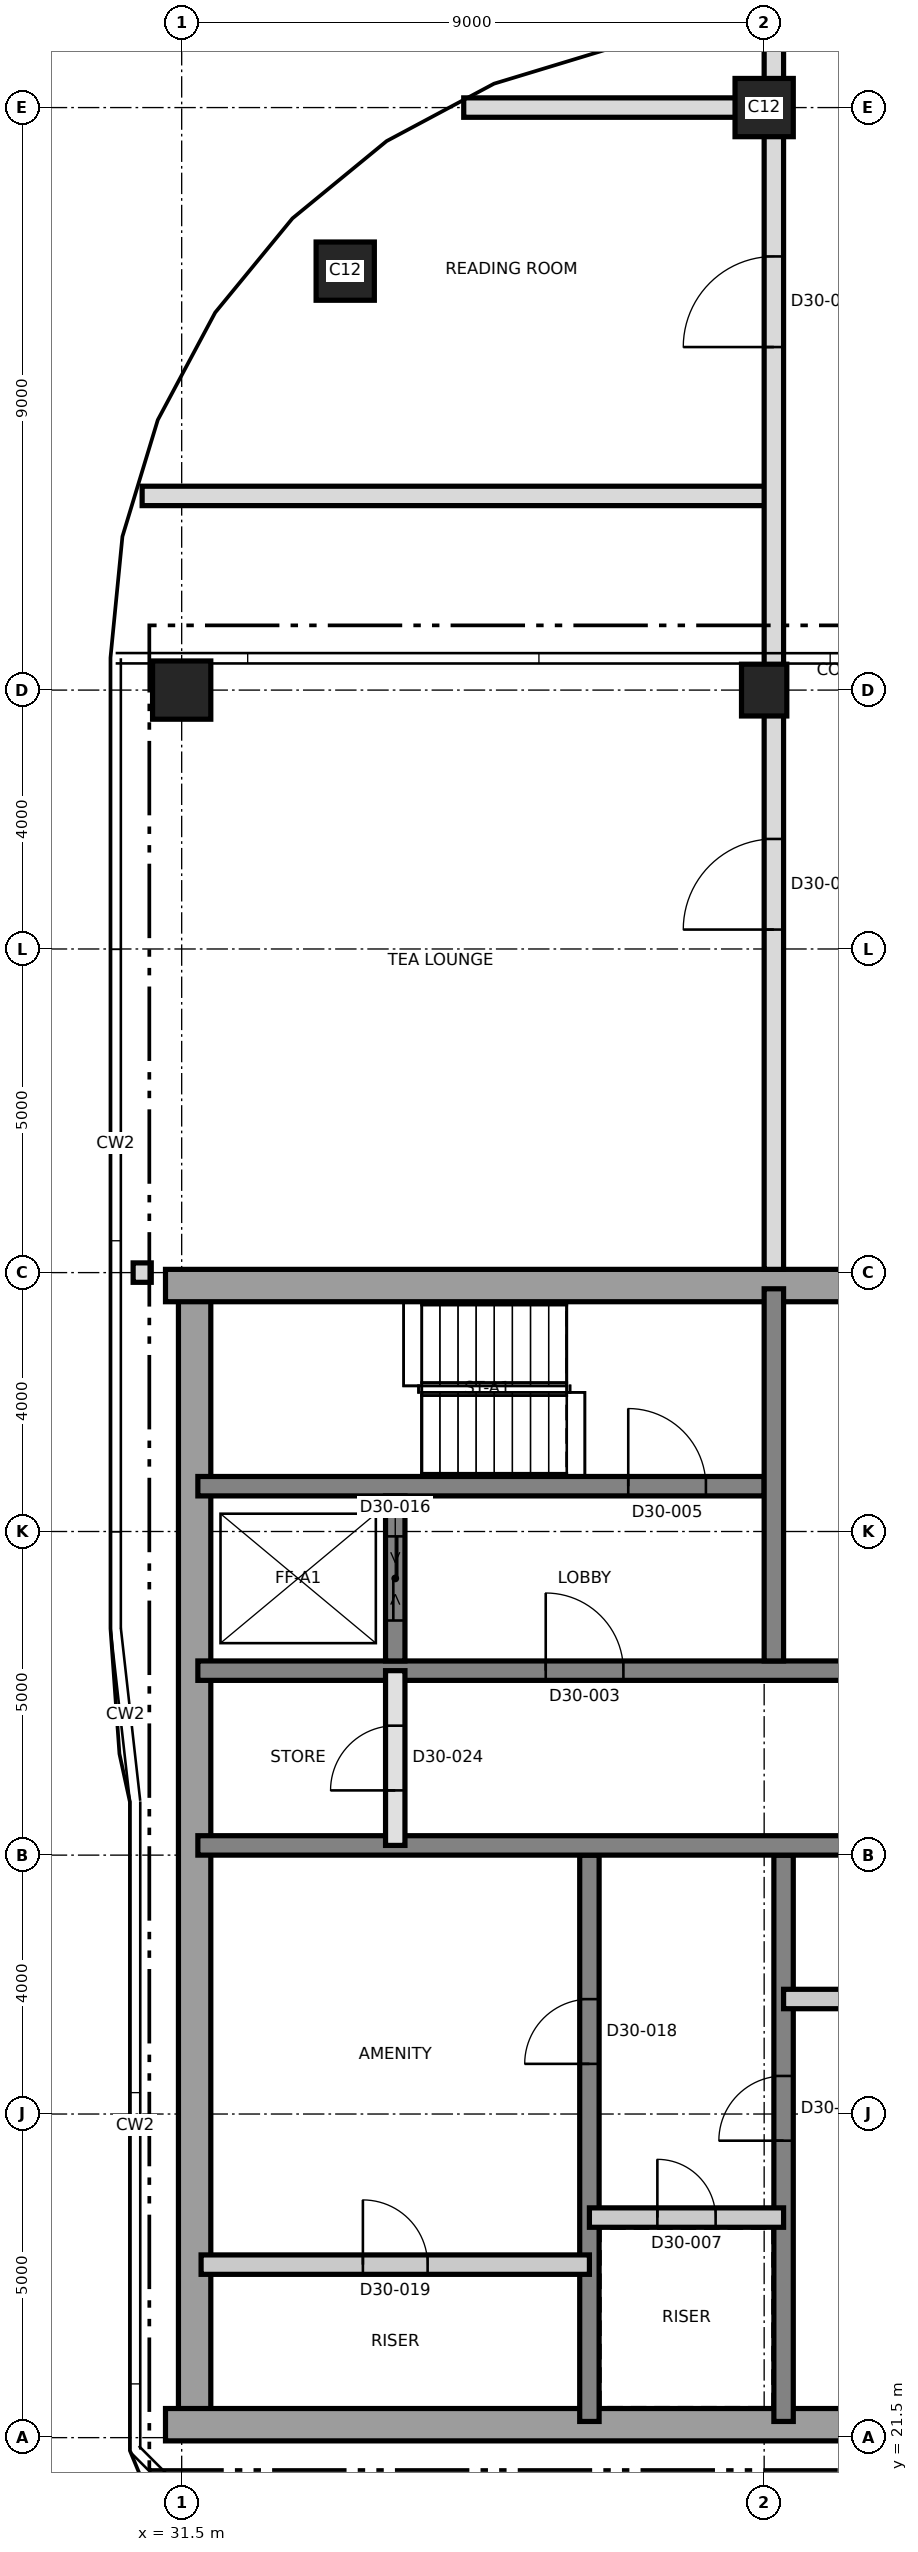
"""IFC4 building model, lengths in metres.
Left out: names, types, materials, properties, quantities, classifications, styles, units other than length and angle.
Written with IfcOpenShell. Run it as: python <this file> out.ifc"""

import sys

from ifc_helpers import new_model, si_unit, direction, frame, frame_2d, origin, origin_2d, place, context, subcontext, project, spatial, rectangle, extrude, element, fill, save


model = new_model("IFC4")
c1 = context("Model", 3, precision=1e-05, world=origin(), true_north=direction((0.0, 1.0)))
c2 = subcontext(c1, "Body", "Model", "MODEL_VIEW")
j1 = project(units=[si_unit("LENGTHUNIT", "METRE"), si_unit("PLANEANGLEUNIT", "RADIAN")], contexts=[c1])
p1 = place(None, origin())
s1 = spatial("IfcSite", under=j1, at=p1, CompositionType="ELEMENT")
p2 = place(p1, origin())
s2 = spatial("IfcBuilding", under=s1, at=p2, CompositionType="ELEMENT")
p3 = place(p2, frame((0.0, 0.0, 260.9)))
s3 = spatial("IfcBuildingStorey", under=s2, at=p3, CompositionType="ELEMENT", Elevation=260.9)
p4 = place(p3, frame((31.7, 21.75, 0.0), z_axis=(0.0, 0.0, 1.0), x_axis=(0.0, 1.0, 0.0)))
e1 = element("IfcWall", 1, at=p4, inside=s3, PredefinedType="SHEAR", context=c2, shape_type="SweptSolid", body=[
    extrude(rectangle(XDim=17.5, YDim=0.5, at=frame_2d((8.75, 0.0))), origin(), (0.0, 0.0, 1.0), 6.0),
])
p5 = place(p3, frame((31.25, 21.7, 0.0), z_axis=(0.0, 0.0, 1.0), x_axis=(1.0, 0.0, 0.0)))
e2 = element("IfcWall", 2, at=p5, inside=s3, PredefinedType="SHEAR", context=c2, shape_type="SweptSolid", body=[
    extrude(rectangle(XDim=27.0, YDim=0.5, at=frame_2d((13.5, 0.0))), origin(), (0.0, 0.0, 1.0), 6.0),
])
p6 = place(p3, frame((31.25, 39.3, 0.0), z_axis=(0.0, 0.0, 1.0), x_axis=(1.0, 0.0, 0.0)))
e3 = element("IfcWall", 3, at=p6, inside=s3, PredefinedType="SHEAR", context=c2, shape_type="SweptSolid", body=[
    extrude(rectangle(XDim=27.0, YDim=0.5, at=frame_2d((13.5, 0.0))), origin(), (0.0, 0.0, 1.0), 6.0),
])
p7 = place(p6, frame((10.45, 0.0, 0.0)))
e4 = element("IfcOpeningElement", 4, at=p7, cuts=e3, PredefinedType="OPENING", context=c2, shape_type="SweptSolid", body=[
    extrude(rectangle(XDim=1.2, YDim=2.1, at=frame_2d((0.6, 1.05))), frame((0.0, 0.26, 0.0), z_axis=(0.0, -1.0, 0.0), x_axis=(1.0, 0.0, 0.0)), (0.0, 0.0, 1.0), 0.52),
])
p8 = place(p3, frame((37.8, 21.75, 0.0), z_axis=(0.0, 0.0, 1.0), x_axis=(0.0, 1.0, 0.0)))
e5 = element("IfcWall", 5, at=p8, inside=s3, PredefinedType="SHEAR", context=c2, shape_type="SweptSolid", body=[
    extrude(rectangle(XDim=8.75, YDim=0.3, at=frame_2d((4.375, 0.0))), origin(), (0.0, 0.0, 1.0), 6.0),
])
p9 = place(p8, frame((5.525, 0.0, 0.0)))
e6 = element("IfcOpeningElement", 6, at=p9, cuts=e5, PredefinedType="OPENING", context=c2, shape_type="SweptSolid", body=[
    extrude(rectangle(XDim=1.0, YDim=2.1, at=frame_2d((0.5, 1.05))), frame((0.0, 0.16, 0.0), z_axis=(0.0, -1.0, 0.0), x_axis=(1.0, 0.0, 0.0)), (0.0, 0.0, 1.0), 0.32),
])
p10 = place(p3, frame((40.8, 21.75, 0.0), z_axis=(0.0, 0.0, 1.0), x_axis=(0.0, 1.0, 0.0)))
e7 = element("IfcWall", 7, at=p10, inside=s3, PredefinedType="SHEAR", context=c2, shape_type="SweptSolid", body=[
    extrude(rectangle(XDim=8.75, YDim=0.3, at=frame_2d((4.375, 0.0))), origin(), (0.0, 0.0, 1.0), 6.0),
])
p11 = place(p10, frame((4.338, 0.0, 0.0)))
e8 = element("IfcOpeningElement", 8, at=p11, cuts=e7, PredefinedType="OPENING", context=c2, shape_type="SweptSolid", body=[
    extrude(rectangle(XDim=1.0, YDim=2.1, at=frame_2d((0.5, 1.05))), frame((0.0, 0.16, 0.0), z_axis=(0.0, -1.0, 0.0), x_axis=(1.0, 0.0, 0.0)), (0.0, 0.0, 1.0), 0.32),
])
p12 = place(p3, frame((31.75, 30.65, 0.0), z_axis=(0.0, 0.0, 1.0), x_axis=(1.0, 0.0, 0.0)))
e9 = element("IfcWall", 9, at=p12, inside=s3, PredefinedType="SHEAR", context=c2, shape_type="SweptSolid", body=[
    extrude(rectangle(XDim=26.5, YDim=0.3, at=frame_2d((13.25, 0.0))), origin(), (0.0, 0.0, 1.0), 6.0),
])
p13 = place(p12, frame((24.75, 0.0, 0.0)))
e10 = element("IfcOpeningElement", 10, at=p13, cuts=e9, PredefinedType="OPENING", context=c2, shape_type="SweptSolid", body=[
    extrude(rectangle(XDim=1.0, YDim=2.1, at=frame_2d((0.5, 1.05))), frame((0.0, 0.16, 0.0), z_axis=(0.0, -1.0, 0.0), x_axis=(1.0, 0.0, 0.0)), (0.0, 0.0, 1.0), 0.32),
])
p14 = place(p12, frame((11.55, 0.0, 0.0)))
e11 = element("IfcOpeningElement", 11, at=p14, cuts=e9, PredefinedType="OPENING", context=c2, shape_type="SweptSolid", body=[
    extrude(rectangle(XDim=1.0, YDim=2.1, at=frame_2d((0.5, 1.05))), frame((0.0, 0.16, 0.0), z_axis=(0.0, -1.0, 0.0), x_axis=(1.0, 0.0, 0.0)), (0.0, 0.0, 1.0), 0.32),
])
p15 = place(p3, frame((31.75, 33.35, 0.0), z_axis=(0.0, 0.0, 1.0), x_axis=(1.0, 0.0, 0.0)))
e12 = element("IfcWall", 12, at=p15, inside=s3, PredefinedType="SHEAR", context=c2, shape_type="SweptSolid", body=[
    extrude(rectangle(XDim=26.5, YDim=0.3, at=frame_2d((13.25, 0.0))), origin(), (0.0, 0.0, 1.0), 6.0),
])
p16 = place(p15, frame((13.9, 0.0, 0.0)))
e13 = element("IfcOpeningElement", 13, at=p16, cuts=e12, PredefinedType="OPENING", context=c2, shape_type="SweptSolid", body=[
    extrude(rectangle(XDim=1.4, YDim=2.1, at=frame_2d((0.7, 1.05))), frame((0.0, 0.16, 0.0), z_axis=(0.0, -1.0, 0.0), x_axis=(1.0, 0.0, 0.0)), (0.0, 0.0, 1.0), 0.32),
])
p17 = place(p15, frame((5.375, 0.0, 0.0)))
e14 = element("IfcOpeningElement", 14, at=p17, cuts=e12, PredefinedType="OPENING", context=c2, shape_type="SweptSolid", body=[
    extrude(rectangle(XDim=1.2, YDim=2.1, at=frame_2d((0.6, 1.05))), frame((0.0, 0.16, 0.0), z_axis=(0.0, -1.0, 0.0), x_axis=(1.0, 0.0, 0.0)), (0.0, 0.0, 1.0), 0.32),
])
p18 = place(p15, frame((19.925, 0.0, 0.0)))
e15 = element("IfcOpeningElement", 15, at=p18, cuts=e12, PredefinedType="OPENING", context=c2, shape_type="SweptSolid", body=[
    extrude(rectangle(XDim=1.2, YDim=2.1, at=frame_2d((0.6, 1.05))), frame((0.0, 0.16, 0.0), z_axis=(0.0, -1.0, 0.0), x_axis=(1.0, 0.0, 0.0)), (0.0, 0.0, 1.0), 0.32),
])
p19 = place(p3, frame((31.75, 36.2, 0.0), z_axis=(0.0, 0.0, 1.0), x_axis=(1.0, 0.0, 0.0)))
e16 = element("IfcWall", 16, at=p19, inside=s3, PredefinedType="SHEAR", context=c2, shape_type="SweptSolid", body=[
    extrude(rectangle(XDim=8.75, YDim=0.3, at=frame_2d((4.375, 0.0))), origin(), (0.0, 0.0, 1.0), 6.0),
])
p20 = place(p19, frame((6.65, 0.0, 0.0)))
e17 = element("IfcOpeningElement", 17, at=p20, cuts=e16, PredefinedType="OPENING", context=c2, shape_type="SweptSolid", body=[
    extrude(rectangle(XDim=1.2, YDim=2.1, at=frame_2d((0.6, 1.05))), frame((0.0, 0.16, 0.0), z_axis=(0.0, -1.0, 0.0), x_axis=(1.0, 0.0, 0.0)), (0.0, 0.0, 1.0), 0.32),
])
p21 = place(p3, frame((40.65, 33.5, 0.0), z_axis=(0.0, 0.0, 1.0), x_axis=(0.0, 1.0, 0.0)))
e18 = element("IfcWall", 18, at=p21, inside=s3, PredefinedType="SHEAR", context=c2, shape_type="SweptSolid", body=[
    extrude(rectangle(XDim=5.75, YDim=0.3, at=frame_2d((2.875, 0.0))), origin(), (0.0, 0.0, 1.0), 6.0),
])
p22 = place(p3, frame((34.8, 33.5, 0.0), z_axis=(0.0, 0.0, 1.0), x_axis=(0.0, 1.0, 0.0)))
e19 = element("IfcWall", 19, at=p22, inside=s3, PredefinedType="SHEAR", context=c2, shape_type="SweptSolid", body=[
    extrude(rectangle(XDim=2.55, YDim=0.3, at=frame_2d((1.275, 0.0))), origin(), (0.0, 0.0, 1.0), 6.0),
])
p23 = place(p22, frame((0.625, 0.0, 0.0)))
e20 = element("IfcOpeningElement", 20, at=p23, cuts=e19, PredefinedType="OPENING", context=c2, shape_type="SweptSolid", body=[
    extrude(rectangle(XDim=1.3, YDim=2.4, at=frame_2d((0.65, 1.2))), frame((0.0, 0.16, 0.0), z_axis=(0.0, -1.0, 0.0), x_axis=(1.0, 0.0, 0.0)), (0.0, 0.0, 1.0), 0.32),
])
p24 = place(p3, frame((31.5, 48.5, 0.0), z_axis=(0.0, 0.0, 1.0), x_axis=(1.0, 0.0, 0.0)))
e21 = element("IfcColumn", 21, at=p24, inside=s3, PredefinedType="COLUMN", context=c2, shape_type="SweptSolid", body=[
    extrude(rectangle(XDim=0.9, YDim=0.9, at=origin_2d()), origin(), (0.0, 0.0, 1.0), 6.0),
])
p25 = place(p3, frame((40.5, 48.5, 0.0), z_axis=(0.0, 0.0, 1.0), x_axis=(0.0, 1.0, 0.0)))
e22 = element("IfcColumn", 22, at=p25, inside=s3, PredefinedType="COLUMN", context=c2, shape_type="SweptSolid", body=[
    extrude(rectangle(XDim=0.8, YDim=0.7, at=origin_2d()), origin(), (0.0, 0.0, 1.0), 6.0),
])
for number, where, z_axis, x_axis in (
    (23, (34.027, 54.973, 0.0), (0.0, 0.0, 1.0), (1.0, 0.0, 0.0)),
    (24, (40.5, 57.5, 0.0), (0.0, 0.0, 1.0), (1.0, 0.0, 0.0)),
):
    element("IfcColumn", number, at=place(p3, frame(where, z_axis=z_axis, x_axis=x_axis)), inside=s3, PredefinedType="COLUMN", context=c2, shape_type="SweptSolid", body=[
        extrude(rectangle(XDim=0.9, YDim=0.9, at=origin_2d()), origin(), (0.0, 0.0, 1.0), 6.0),
    ])
p26 = place(p3, frame((31.8, 24.173, 0.0), z_axis=(0.0, 0.0, 1.0), x_axis=(1.0, 0.0, 0.0)))
e25 = element("IfcWall", 25, at=p26, inside=s3, PredefinedType="PARTITIONING", context=c2, shape_type="SweptSolid", body=[
    extrude(rectangle(XDim=6.0, YDim=0.3, at=frame_2d((3.0, 0.0))), origin(), (0.0, 0.0, 1.0), 5.7),
])
p27 = place(p26, frame((2.5, 0.0, 0.0)))
e26 = element("IfcOpeningElement", 26, at=p27, cuts=e25, PredefinedType="OPENING", context=c2, shape_type="SweptSolid", body=[
    extrude(rectangle(XDim=1.0, YDim=2.1, at=frame_2d((0.5, 1.05))), frame((0.0, 0.16, 0.0), z_axis=(0.0, -1.0, 0.0), x_axis=(1.0, 0.0, 0.0)), (0.0, 0.0, 1.0), 0.32),
])
p28 = place(p3, frame((37.8, 24.9, 0.0), z_axis=(0.0, 0.0, 1.0), x_axis=(1.0, 0.0, 0.0)))
e27 = element("IfcWall", 27, at=p28, inside=s3, PredefinedType="PARTITIONING", context=c2, shape_type="SweptSolid", body=[
    extrude(rectangle(XDim=3.0, YDim=0.3, at=frame_2d((1.5, 0.0))), origin(), (0.0, 0.0, 1.0), 5.7),
])
p29 = place(p28, frame((1.05, 0.0, 0.0)))
e28 = element("IfcOpeningElement", 28, at=p29, cuts=e27, PredefinedType="OPENING", context=c2, shape_type="SweptSolid", body=[
    extrude(rectangle(XDim=0.9, YDim=2.1, at=frame_2d((0.45, 1.05))), frame((0.0, 0.16, 0.0), z_axis=(0.0, -1.0, 0.0), x_axis=(1.0, 0.0, 0.0)), (0.0, 0.0, 1.0), 0.32),
])
p30 = place(p3, frame((40.8, 28.277, 0.0), z_axis=(0.0, 0.0, 1.0), x_axis=(1.0, 0.0, 0.0)))
e29 = element("IfcWall", 29, at=p30, inside=s3, PredefinedType="PARTITIONING", context=c2, shape_type="SweptSolid", body=[
    extrude(rectangle(XDim=6.0, YDim=0.3, at=frame_2d((3.0, 0.0))), origin(), (0.0, 0.0, 1.0), 5.7),
])
p31 = place(p3, frame((34.8, 30.65, 0.0), z_axis=(0.0, 0.0, 1.0), x_axis=(0.0, 1.0, 0.0)))
e30 = element("IfcWall", 30, at=p31, inside=s3, PredefinedType="SOLIDWALL", context=c2, shape_type="SweptSolid", body=[
    extrude(rectangle(XDim=2.7, YDim=0.3, at=frame_2d((1.35, 0.0))), origin(), (0.0, 0.0, 1.0), 5.7),
])
p32 = place(p31, frame((0.85, 0.0, 0.0)))
e31 = element("IfcOpeningElement", 31, at=p32, cuts=e30, PredefinedType="OPENING", context=c2, shape_type="SweptSolid", body=[
    extrude(rectangle(XDim=1.0, YDim=2.1, at=frame_2d((0.5, 1.05))), frame((0.0, 0.16, 0.0), z_axis=(0.0, -1.0, 0.0), x_axis=(1.0, 0.0, 0.0)), (0.0, 0.0, 1.0), 0.32),
])
p33 = place(p3, frame((30.75, 39.5, 0.0), z_axis=(0.0, 0.0, 1.0), x_axis=(1.0, 0.0, 0.0)))
e32 = element("IfcWall", 32, at=p33, inside=s3, PredefinedType="PARTITIONING", context=c2, shape_type="SweptSolid", body=[
    extrude(rectangle(XDim=0.28, YDim=0.3, at=frame_2d((0.14, 0.0))), origin(), (0.0, 0.0, 1.0), 5.7),
])
p34 = place(p3, frame((30.889, 51.5, 0.0), z_axis=(0.0, 0.0, 1.0), x_axis=(1.0, 0.0, 0.0)))
e33 = element("IfcWall", 33, at=p34, inside=s3, PredefinedType="PARTITIONING", context=c2, shape_type="SweptSolid", body=[
    extrude(rectangle(XDim=9.761, YDim=0.3, at=frame_2d((4.88, 0.0))), origin(), (0.0, 0.0, 1.0), 5.65),
])
p35 = place(p3, frame((35.858, 57.5, 0.0), z_axis=(0.0, 0.0, 1.0), x_axis=(1.0, 0.0, 0.0)))
e34 = element("IfcWall", 34, at=p35, inside=s3, PredefinedType="PARTITIONING", context=c2, shape_type="SweptSolid", body=[
    extrude(rectangle(XDim=4.792, YDim=0.3, at=frame_2d((2.396, 0.0))), origin(), (0.0, 0.0, 1.0), 5.65),
])
p36 = place(p3, frame((40.65, 39.55, 0.0), z_axis=(0.0, 0.0, 1.0), x_axis=(0.0, 1.0, 0.0)))
e35 = element("IfcWall", 35, at=p36, inside=s3, PredefinedType="PARTITIONING", context=c2, shape_type="SweptSolid", body=[
    extrude(rectangle(XDim=18.94, YDim=0.3, at=frame_2d((9.47, 0.0))), origin(), (0.0, 0.0, 1.0), 5.65),
])
p37 = place(p36, frame((5.25, 0.0, 0.0)))
e36 = element("IfcOpeningElement", 36, at=p37, cuts=e35, PredefinedType="OPENING", context=c2, shape_type="SweptSolid", body=[
    extrude(rectangle(XDim=1.4, YDim=2.1, at=frame_2d((0.7, 1.05))), frame((0.0, 0.16, 0.0), z_axis=(0.0, -1.0, 0.0), x_axis=(1.0, 0.0, 0.0)), (0.0, 0.0, 1.0), 0.32),
])
p38 = place(p36, frame((14.25, 0.0, 0.0)))
e37 = element("IfcOpeningElement", 37, at=p38, cuts=e35, PredefinedType="OPENING", context=c2, shape_type="SweptSolid", body=[
    extrude(rectangle(XDim=1.4, YDim=2.1, at=frame_2d((0.7, 1.05))), frame((0.0, 0.16, 0.0), z_axis=(0.0, -1.0, 0.0), x_axis=(1.0, 0.0, 0.0)), (0.0, 0.0, 1.0), 0.32),
])
p39 = place(p17, origin())
e38 = element("IfcDoor", 38, at=p39, inside=s3, OperationType="SINGLE_SWING_LEFT", PredefinedType="DOOR", context=c2, shape_type="SweptSolid", body=[
    extrude(rectangle(XDim=1.2, YDim=2.1, at=frame_2d((0.6, 1.05))), frame((0.0, 0.025, 0.0), z_axis=(0.0, -1.0, 0.0), x_axis=(1.0, 0.0, 0.0)), (0.0, 0.0, 1.0), 0.05),
])
fill(e14, e38)
p40 = place(p20, origin())
e39 = element("IfcDoor", 39, at=p40, inside=s3, OperationType="SINGLE_SWING_RIGHT", PredefinedType="DOOR", context=c2, shape_type="SweptSolid", body=[
    extrude(rectangle(XDim=1.2, YDim=2.1, at=frame_2d((0.6, 1.05))), frame((0.0, 0.025, 0.0), z_axis=(0.0, -1.0, 0.0), x_axis=(1.0, 0.0, 0.0)), (0.0, 0.0, 1.0), 0.05),
])
fill(e17, e39)
p41 = place(p29, origin())
e40 = element("IfcDoor", 40, at=p41, inside=s3, OperationType="SINGLE_SWING_LEFT", PredefinedType="DOOR", context=c2, shape_type="SweptSolid", body=[
    extrude(rectangle(XDim=0.9, YDim=2.1, at=frame_2d((0.45, 1.05))), frame((0.0, 0.025, 0.0), z_axis=(0.0, -1.0, 0.0), x_axis=(1.0, 0.0, 0.0)), (0.0, 0.0, 1.0), 0.05),
])
fill(e28, e40)
p42 = place(p23, origin())
e41 = element("IfcDoor", 41, at=p42, inside=s3, OperationType="SLIDING_TO_LEFT", PredefinedType="DOOR", context=c2, shape_type="SweptSolid", body=[
    extrude(rectangle(XDim=1.3, YDim=2.4, at=frame_2d((0.65, 1.2))), frame((0.0, 0.025, 0.0), z_axis=(0.0, -1.0, 0.0), x_axis=(1.0, 0.0, 0.0)), (0.0, 0.0, 1.0), 0.05),
])
fill(e20, e41)
p43 = place(p9, origin())
e42 = element("IfcDoor", 42, at=p43, inside=s3, OperationType="SINGLE_SWING_LEFT", PredefinedType="DOOR", context=c2, shape_type="SweptSolid", body=[
    extrude(rectangle(XDim=1.0, YDim=2.1, at=frame_2d((0.5, 1.05))), frame((0.0, 0.025, 0.0), z_axis=(0.0, -1.0, 0.0), x_axis=(1.0, 0.0, 0.0)), (0.0, 0.0, 1.0), 0.05),
])
fill(e6, e42)
p44 = place(p27, origin())
e43 = element("IfcDoor", 43, at=p44, inside=s3, OperationType="SINGLE_SWING_RIGHT", PredefinedType="DOOR", context=c2, shape_type="SweptSolid", body=[
    extrude(rectangle(XDim=1.0, YDim=2.1, at=frame_2d((0.5, 1.05))), frame((0.0, 0.025, 0.0), z_axis=(0.0, -1.0, 0.0), x_axis=(1.0, 0.0, 0.0)), (0.0, 0.0, 1.0), 0.05),
])
fill(e26, e43)
p45 = place(p11, origin())
e44 = element("IfcDoor", 44, at=p45, inside=s3, OperationType="SINGLE_SWING_RIGHT", PredefinedType="DOOR", context=c2, shape_type="SweptSolid", body=[
    extrude(rectangle(XDim=1.0, YDim=2.1, at=frame_2d((0.5, 1.05))), frame((0.0, 0.025, 0.0), z_axis=(0.0, -1.0, 0.0), x_axis=(1.0, 0.0, 0.0)), (0.0, 0.0, 1.0), 0.05),
])
fill(e8, e44)
p46 = place(p32, origin())
e45 = element("IfcDoor", 45, at=p46, inside=s3, OperationType="SINGLE_SWING_LEFT", PredefinedType="DOOR", context=c2, shape_type="SweptSolid", body=[
    extrude(rectangle(XDim=1.0, YDim=2.1, at=frame_2d((0.5, 1.05))), frame((0.0, 0.025, 0.0), z_axis=(0.0, -1.0, 0.0), x_axis=(1.0, 0.0, 0.0)), (0.0, 0.0, 1.0), 0.05),
])
fill(e31, e45)
p47 = place(p37, origin())
e46 = element("IfcDoor", 46, at=p47, inside=s3, OperationType="SINGLE_SWING_LEFT", PredefinedType="DOOR", context=c2, shape_type="SweptSolid", body=[
    extrude(rectangle(XDim=1.4, YDim=2.1, at=frame_2d((0.7, 1.05))), frame((0.0, 0.025, 0.0), z_axis=(0.0, -1.0, 0.0), x_axis=(1.0, 0.0, 0.0)), (0.0, 0.0, 1.0), 0.05),
])
fill(e36, e46)
p48 = place(p38, origin())
e47 = element("IfcDoor", 47, at=p48, inside=s3, OperationType="SINGLE_SWING_LEFT", PredefinedType="DOOR", context=c2, shape_type="SweptSolid", body=[
    extrude(rectangle(XDim=1.4, YDim=2.1, at=frame_2d((0.7, 1.05))), frame((0.0, 0.025, 0.0), z_axis=(0.0, -1.0, 0.0), x_axis=(1.0, 0.0, 0.0)), (0.0, 0.0, 1.0), 0.05),
])
fill(e37, e47)
save(model, sys.argv[1])
